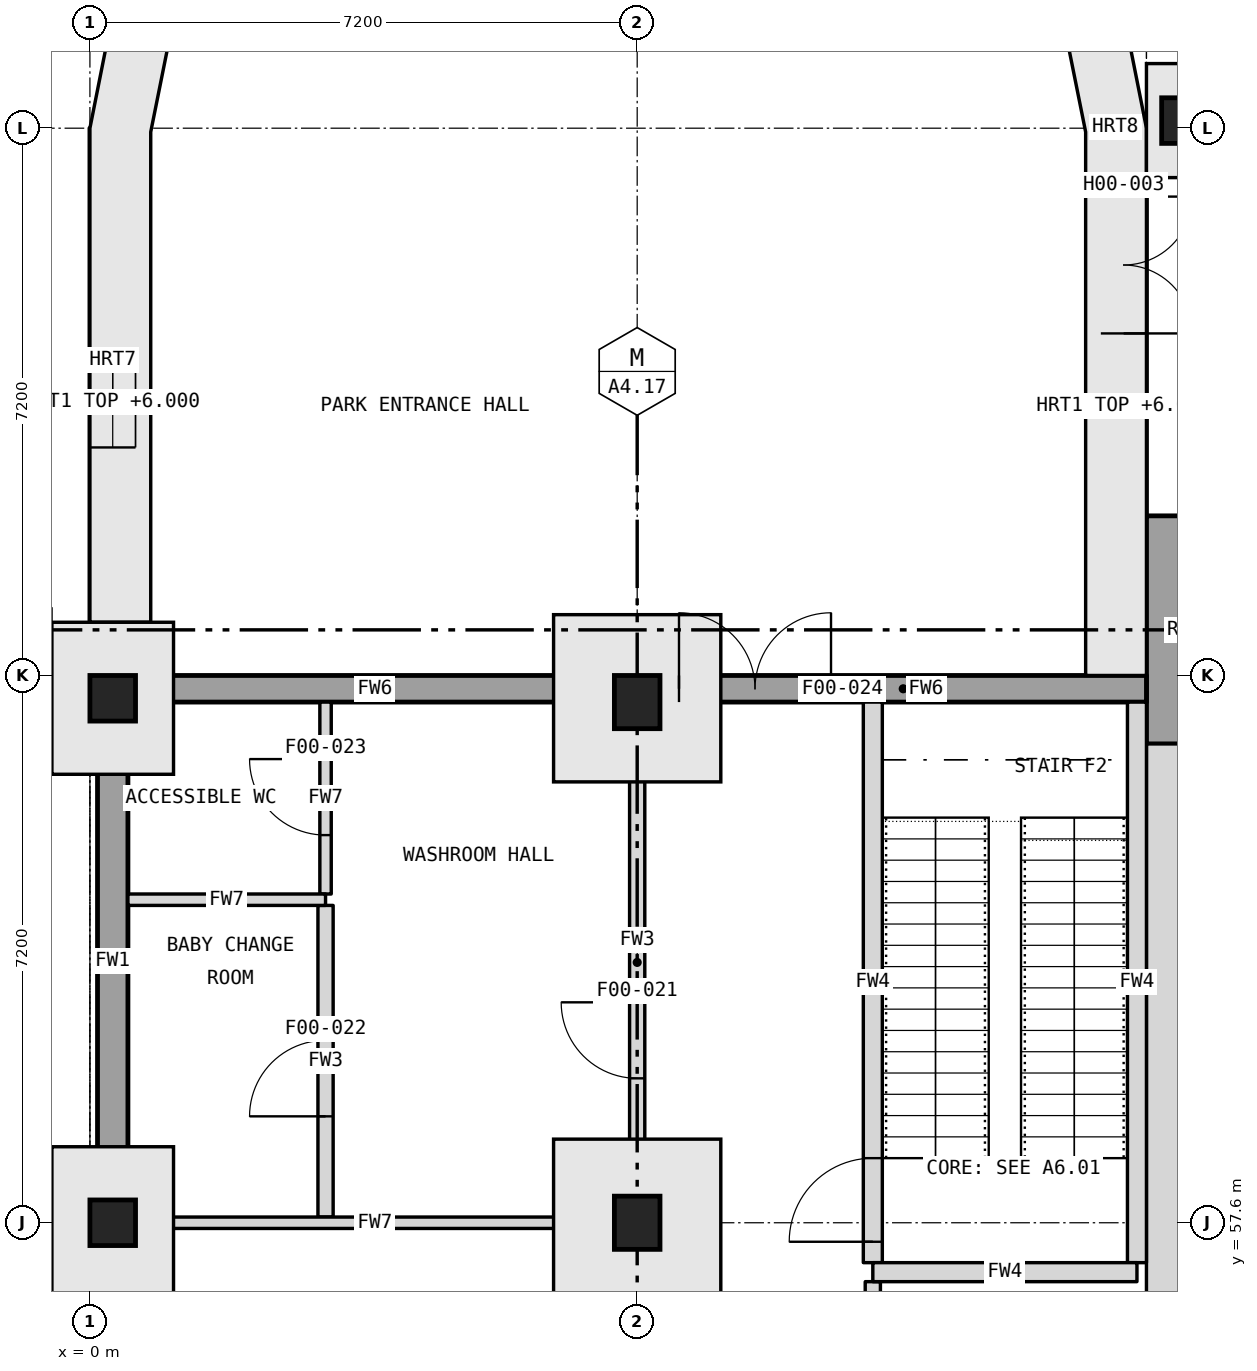
"""IFC4 building model, lengths in metres.
Left out: names, types, materials, properties, quantities, classifications, styles, units other than length and angle.
Written with IfcOpenShell. Run it as: python <this file> out.ifc"""

import sys

from ifc_helpers import new_model, si_unit, direction, frame, frame_2d, origin, origin_2d, place, context, subcontext, project, spatial, rectangle, extrude, element, fill, save


model = new_model("IFC4")
c1 = context("Model", 3, precision=1e-05, world=origin(), true_north=direction((0.0, 1.0)))
c2 = subcontext(c1, "Body", "Model", "MODEL_VIEW")
j1 = project(units=[si_unit("LENGTHUNIT", "METRE"), si_unit("PLANEANGLEUNIT", "RADIAN")], contexts=[c1])
p1 = place(None, origin())
s1 = spatial("IfcSite", under=j1, at=p1, CompositionType="ELEMENT")
p2 = place(p1, origin())
s2 = spatial("IfcBuilding", under=s1, at=p2, CompositionType="ELEMENT")
p3 = place(p2, origin())
s3 = spatial("IfcBuildingStorey", under=s2, at=p3, CompositionType="ELEMENT", Elevation=0.0)
p4 = place(p3, frame((0.3, 64.8, 0.0), z_axis=(0.0, 0.0, 1.0), x_axis=(0.0, 1.0, 0.0)))
e1 = element("IfcWall", 1, at=p4, inside=s3, PredefinedType="SOLIDWALL", context=c2, shape_type="SweptSolid", body=[
    extrude(rectangle(XDim=7.2, YDim=0.6, at=frame_2d((3.6, 0.0))), origin(), (0.0, 0.0, 1.0), 6.0),
])
p5 = place(p4, frame((3.0, 0.0, 0.9)))
e2 = element("IfcOpeningElement", 2, at=p5, cuts=e1, PredefinedType="OPENING", context=c2, shape_type="SweptSolid", body=[
    extrude(rectangle(XDim=1.2, YDim=2.6, at=frame_2d((0.6, 1.3))), frame((0.0, 0.31, 0.0), z_axis=(0.0, -1.0, 0.0), x_axis=(1.0, 0.0, 0.0)), (0.0, 0.0, 1.0), 0.62),
])
p6 = place(p3, frame((13.6, 64.7, 0.0), z_axis=(0.0, 0.0, 1.0), x_axis=(0.0, 1.0, 0.0)))
e3 = element("IfcWall", 3, at=p6, inside=s3, PredefinedType="SOLIDWALL", context=c2, shape_type="SweptSolid", body=[
    extrude(rectangle(XDim=7.3, YDim=0.6, at=frame_2d((3.65, 0.0))), origin(), (0.0, 0.0, 1.0), 6.0),
])
p7 = place(p6, frame((4.6, 0.0, 0.0)))
e4 = element("IfcOpeningElement", 4, at=p7, cuts=e3, PredefinedType="OPENING", context=c2, shape_type="SweptSolid", body=[
    extrude(rectangle(XDim=1.8, YDim=2.4, at=frame_2d((0.9, 1.2))), frame((0.0, 0.31, 0.0), z_axis=(0.0, -1.0, 0.0), x_axis=(1.0, 0.0, 0.0)), (0.0, 0.0, 1.0), 0.62),
])
p8 = place(p3, frame((14.4, 63.9, 0.0), z_axis=(0.0, 0.0, 1.0), x_axis=(0.0, 1.0, 0.0)))
e5 = element("IfcWall", 5, at=p8, inside=s3, PredefinedType="SOLIDWALL", context=c2, shape_type="SweptSolid", body=[
    extrude(rectangle(XDim=3.0, YDim=1.0, at=frame_2d((1.5, 0.0))), origin(), (0.0, 0.0, 1.0), 6.0),
])
p9 = place(p3, frame((14.4, 14.0, 0.0), z_axis=(0.0, 0.0, 1.0), x_axis=(0.0, 1.0, 0.0)))
e6 = element("IfcWall", 6, at=p9, inside=s3, PredefinedType="SOLIDWALL", context=c2, shape_type="SweptSolid", body=[
    extrude(rectangle(XDim=49.9, YDim=1.0, at=frame_2d((24.95, 0.0))), origin(), (0.0, 0.0, 1.0), 6.0),
])
p10 = place(p9, frame((30.9, 0.0, 0.0)))
e7 = element("IfcOpeningElement", 7, at=p10, cuts=e6, PredefinedType="OPENING", context=c2, shape_type="SweptSolid", body=[
    extrude(rectangle(XDim=2.4, YDim=2.7, at=frame_2d((1.2, 1.35))), frame((0.0, 0.51, 0.0), z_axis=(0.0, -1.0, 0.0), x_axis=(1.0, 0.0, 0.0)), (0.0, 0.0, 1.0), 1.02),
])
for number, where, z_axis, x_axis in (
    (8, (14.4, 72.1, -0.45), (0.0, 0.0, 1.0), (1.0, 0.0, 0.0)),
    (9, (0.3, 57.6, -0.45), (0.0, 0.0, 1.0), (1.0, 0.0, 0.0)),
    (10, (0.3, 64.5, -0.45), (0.0, 0.0, 1.0), (1.0, 0.0, 0.0)),
):
    element("IfcColumn", number, at=place(p3, frame(where, z_axis=z_axis, x_axis=x_axis)), inside=s3, PredefinedType="COLUMN", context=c2, shape_type="SweptSolid", body=[
        extrude(rectangle(XDim=0.6, YDim=0.6, at=origin_2d()), origin(), (0.0, 0.0, 1.0), 6.45),
    ])
p11 = place(p3, frame((7.2, 57.6, -0.405), z_axis=(0.0, 0.0, 1.0), x_axis=(1.0, 0.0, 0.0)))
e11 = element("IfcColumn", 11, at=p11, inside=s3, PredefinedType="COLUMN", context=c2, shape_type="SweptSolid", body=[
    extrude(rectangle(XDim=0.6, YDim=0.7, at=origin_2d()), origin(), (0.0, 0.0, 1.0), 6.405),
])
p12 = place(p3, frame((7.2, 64.45, -0.45), z_axis=(0.0, 0.0, 1.0), x_axis=(1.0, 0.0, 0.0)))
e12 = element("IfcColumn", 12, at=p12, inside=s3, PredefinedType="COLUMN", context=c2, shape_type="SweptSolid", body=[
    extrude(rectangle(XDim=0.6, YDim=0.7, at=origin_2d()), origin(), (0.0, 0.0, 1.0), 6.45),
])
p13 = place(p3, frame((0.6, 64.625, 0.0), z_axis=(0.0, 0.0, 1.0), x_axis=(1.0, 0.0, 0.0)))
e13 = element("IfcWall", 13, at=p13, inside=s3, PredefinedType="SOLIDWALL", context=c2, shape_type="SweptSolid", body=[
    extrude(rectangle(XDim=6.3, YDim=0.35, at=frame_2d((3.15, 0.0))), origin(), (0.0, 0.0, 1.0), 5.675),
])
p14 = place(p3, frame((7.5, 64.625, 0.0), z_axis=(0.0, 0.0, 1.0), x_axis=(1.0, 0.0, 0.0)))
e14 = element("IfcWall", 14, at=p14, inside=s3, PredefinedType="SOLIDWALL", context=c2, shape_type="SweptSolid", body=[
    extrude(rectangle(XDim=6.4, YDim=0.35, at=frame_2d((3.2, 0.0))), origin(), (0.0, 0.0, 1.0), 5.675),
])
p15 = place(p14, frame((0.25, 0.0, 0.0)))
e15 = element("IfcOpeningElement", 15, at=p15, cuts=e14, PredefinedType="OPENING", context=c2, shape_type="SweptSolid", body=[
    extrude(rectangle(XDim=2.0, YDim=2.4, at=frame_2d((1.0, 1.2))), frame((0.0, 0.185, 0.0), z_axis=(0.0, -1.0, 0.0), x_axis=(1.0, 0.0, 0.0)), (0.0, 0.0, 1.0), 0.37),
])
p16 = place(p3, frame((0.3, 50.7, 0.0), z_axis=(0.0, 0.0, 1.0), x_axis=(0.0, 1.0, 0.0)))
e16 = element("IfcWall", 16, at=p16, inside=s3, PredefinedType="SOLIDWALL", context=c2, shape_type="SweptSolid", body=[
    extrude(rectangle(XDim=6.6, YDim=0.4, at=frame_2d((3.3, 0.0))), origin(), (0.0, 0.0, 1.0), 5.675),
])
p17 = place(p16, frame((2.7, 0.0, 1.5)))
e17 = element("IfcOpeningElement", 17, at=p17, cuts=e16, PredefinedType="OPENING", context=c2, shape_type="SweptSolid", body=[
    extrude(rectangle(XDim=1.2, YDim=1.2, at=frame_2d((0.6, 0.6))), frame((0.0, 0.21, 0.0), z_axis=(0.0, -1.0, 0.0), x_axis=(1.0, 0.0, 0.0)), (0.0, 0.0, 1.0), 0.42),
])
p18 = place(p3, frame((0.3, 57.9, 0.0), z_axis=(0.0, 0.0, 1.0), x_axis=(0.0, 1.0, 0.0)))
e18 = element("IfcWall", 18, at=p18, inside=s3, PredefinedType="SOLIDWALL", context=c2, shape_type="SweptSolid", body=[
    extrude(rectangle(XDim=6.3, YDim=0.4, at=frame_2d((3.15, 0.0))), origin(), (0.0, 0.0, 1.0), 5.675),
])
p19 = place(p3, frame((3.1, 61.925, 0.0), z_axis=(0.0, 0.0, 1.0), x_axis=(0.0, 1.0, 0.0)))
e19 = element("IfcWall", 19, at=p19, inside=s3, PredefinedType="PARTITIONING", context=c2, shape_type="SweptSolid", body=[
    extrude(rectangle(XDim=2.525, YDim=0.15, at=frame_2d((1.262, 0.0))), origin(), (0.0, 0.0, 1.0), 5.675),
])
p20 = place(p19, frame((0.775, 0.0, 0.0)))
e20 = element("IfcOpeningElement", 20, at=p20, cuts=e19, PredefinedType="OPENING", context=c2, shape_type="SweptSolid", body=[
    extrude(rectangle(XDim=1.0, YDim=2.1, at=frame_2d((0.5, 1.05))), frame((0.0, 0.085, 0.0), z_axis=(0.0, -1.0, 0.0), x_axis=(1.0, 0.0, 0.0)), (0.0, 0.0, 1.0), 0.17),
])
p21 = place(p3, frame((3.1, 57.675, 0.0), z_axis=(0.0, 0.0, 1.0), x_axis=(0.0, 1.0, 0.0)))
e21 = element("IfcWall", 21, at=p21, inside=s3, PredefinedType="PARTITIONING", context=c2, shape_type="SweptSolid", body=[
    extrude(rectangle(XDim=4.1, YDim=0.2, at=frame_2d((2.05, 0.0))), origin(), (0.0, 0.0, 1.0), 5.675),
])
p22 = place(p21, frame((1.325, 0.0, 0.0)))
e22 = element("IfcOpeningElement", 22, at=p22, cuts=e21, PredefinedType="OPENING", context=c2, shape_type="SweptSolid", body=[
    extrude(rectangle(XDim=1.0, YDim=2.1, at=frame_2d((0.5, 1.05))), frame((0.0, 0.11, 0.0), z_axis=(0.0, -1.0, 0.0), x_axis=(1.0, 0.0, 0.0)), (0.0, 0.0, 1.0), 0.22),
])
p23 = place(p3, frame((7.2, 50.75, 0.0), z_axis=(0.0, 0.0, 1.0), x_axis=(0.0, 1.0, 0.0)))
e23 = element("IfcWall", 23, at=p23, inside=s3, PredefinedType="PARTITIONING", context=c2, shape_type="SweptSolid", body=[
    extrude(rectangle(XDim=6.5, YDim=0.15, at=frame_2d((3.25, 0.0))), origin(), (0.0, 0.0, 1.0), 5.675),
])
p24 = place(p3, frame((7.2, 57.95, 0.0), z_axis=(0.0, 0.0, 1.0), x_axis=(0.0, 1.0, 0.0)))
e24 = element("IfcWall", 24, at=p24, inside=s3, PredefinedType="PARTITIONING", context=c2, shape_type="SweptSolid", body=[
    extrude(rectangle(XDim=6.15, YDim=0.2, at=frame_2d((3.075, 0.0))), origin(), (0.0, 0.0, 1.0), 5.675),
])
p25 = place(p24, frame((1.55, 0.0, 0.0)))
e25 = element("IfcOpeningElement", 25, at=p25, cuts=e24, PredefinedType="OPENING", context=c2, shape_type="SweptSolid", body=[
    extrude(rectangle(XDim=1.0, YDim=2.1, at=frame_2d((0.5, 1.05))), frame((0.0, 0.11, 0.0), z_axis=(0.0, -1.0, 0.0), x_axis=(1.0, 0.0, 0.0)), (0.0, 0.0, 1.0), 0.22),
])
p26 = place(p3, frame((10.3, 57.075, 0.0), z_axis=(0.0, 0.0, 1.0), x_axis=(0.0, 1.0, 0.0)))
e26 = element("IfcWall", 26, at=p26, inside=s3, PredefinedType="SOLIDWALL", context=c2, shape_type="SweptSolid", body=[
    extrude(rectangle(XDim=7.375, YDim=0.25, at=frame_2d((3.688, 0.0))), origin(), (0.0, 0.0, 1.0), 5.675),
])
p27 = place(p26, frame((0.275, 0.0, 0.0)))
e27 = element("IfcOpeningElement", 27, at=p27, cuts=e26, PredefinedType="OPENING", context=c2, shape_type="SweptSolid", body=[
    extrude(rectangle(XDim=1.1, YDim=2.1, at=frame_2d((0.55, 1.05))), frame((0.0, 0.135, 0.0), z_axis=(0.0, -1.0, 0.0), x_axis=(1.0, 0.0, 0.0)), (0.0, 0.0, 1.0), 0.27),
])
p28 = place(p3, frame((10.3, 54.075, 0.0), z_axis=(0.0, 0.0, 1.0), x_axis=(0.0, 1.0, 0.0)))
e28 = element("IfcWall", 28, at=p28, inside=s3, PredefinedType="PARTITIONING", context=c2, shape_type="SweptSolid", body=[
    extrude(rectangle(XDim=2.75, YDim=0.2, at=frame_2d((1.375, 0.0))), origin(), (0.0, 0.0, 1.0), 5.675),
])
p29 = place(p28, frame((0.825, 0.0, 0.0)))
e29 = element("IfcOpeningElement", 29, at=p29, cuts=e28, PredefinedType="OPENING", context=c2, shape_type="SweptSolid", body=[
    extrude(rectangle(XDim=1.0, YDim=2.1, at=frame_2d((0.5, 1.05))), frame((0.0, 0.11, 0.0), z_axis=(0.0, -1.0, 0.0), x_axis=(1.0, 0.0, 0.0)), (0.0, 0.0, 1.0), 0.22),
])
p30 = place(p3, frame((13.775, 57.075, 0.0), z_axis=(0.0, 0.0, 1.0), x_axis=(0.0, 1.0, 0.0)))
e30 = element("IfcWall", 30, at=p30, inside=s3, PredefinedType="SOLIDWALL", context=c2, shape_type="SweptSolid", body=[
    extrude(rectangle(XDim=7.375, YDim=0.25, at=frame_2d((3.688, 0.0))), origin(), (0.0, 0.0, 1.0), 5.675),
])
p31 = place(p3, frame((10.3, 56.95, 0.0), z_axis=(0.0, 0.0, 1.0), x_axis=(1.0, 0.0, 0.0)))
e31 = element("IfcWall", 31, at=p31, inside=s3, PredefinedType="SOLIDWALL", context=c2, shape_type="SweptSolid", body=[
    extrude(rectangle(XDim=3.475, YDim=0.25, at=frame_2d((1.737, 0.0))), origin(), (0.0, 0.0, 1.0), 5.675),
])
p32 = place(p3, frame((0.6, 57.6, 0.0), z_axis=(0.0, 0.0, 1.0), x_axis=(1.0, 0.0, 0.0)))
e32 = element("IfcWall", 32, at=p32, inside=s3, PredefinedType="PARTITIONING", context=c2, shape_type="SweptSolid", body=[
    extrude(rectangle(XDim=6.3, YDim=0.15, at=frame_2d((3.15, 0.0))), origin(), (0.0, 0.0, 1.0), 5.675),
])
p33 = place(p3, frame((0.5, 61.85, 0.0), z_axis=(0.0, 0.0, 1.0), x_axis=(1.0, 0.0, 0.0)))
e33 = element("IfcWall", 33, at=p33, inside=s3, PredefinedType="PARTITIONING", context=c2, shape_type="SweptSolid", body=[
    extrude(rectangle(XDim=2.6, YDim=0.15, at=frame_2d((1.3, 0.0))), origin(), (0.0, 0.0, 1.0), 5.675),
])
p34 = place(p5, origin())
e34 = element("IfcWindow", 34, at=p34, inside=s3, PartitioningType="DOUBLE_PANEL_VERTICAL", PredefinedType="WINDOW", context=c2, shape_type="SweptSolid", body=[
    extrude(rectangle(XDim=1.2, YDim=2.6, at=frame_2d((0.6, 1.3))), frame((0.0, 0.03, 0.0), z_axis=(0.0, -1.0, 0.0), x_axis=(1.0, 0.0, 0.0)), (0.0, 0.0, 1.0), 0.06),
])
fill(e2, e34)
p35 = place(p7, frame((1.8, 0.0, 0.0), z_axis=(0.0, 0.0, 1.0), x_axis=(-1.0, 0.0, 0.0)))
e35 = element("IfcDoor", 35, at=p35, inside=s3, OperationType="DOUBLE_DOOR_SINGLE_SWING", PredefinedType="DOOR", context=c2, shape_type="SweptSolid", body=[
    extrude(rectangle(XDim=1.8, YDim=2.4, at=frame_2d((0.9, 1.2))), frame((0.0, 0.025, 0.0), z_axis=(0.0, -1.0, 0.0), x_axis=(1.0, 0.0, 0.0)), (0.0, 0.0, 1.0), 0.05),
])
fill(e4, e35)
p36 = place(p27, origin())
e36 = element("IfcDoor", 36, at=p36, inside=s3, OperationType="SINGLE_SWING_LEFT", PredefinedType="DOOR", context=c2, shape_type="SweptSolid", body=[
    extrude(rectangle(XDim=1.1, YDim=2.1, at=frame_2d((0.55, 1.05))), frame((0.0, 0.025, 0.0), z_axis=(0.0, -1.0, 0.0), x_axis=(1.0, 0.0, 0.0)), (0.0, 0.0, 1.0), 0.05),
])
fill(e27, e36)
p37 = place(p25, origin())
e37 = element("IfcDoor", 37, at=p37, inside=s3, OperationType="SINGLE_SWING_RIGHT", PredefinedType="DOOR", context=c2, shape_type="SweptSolid", body=[
    extrude(rectangle(XDim=1.0, YDim=2.1, at=frame_2d((0.5, 1.05))), frame((0.0, 0.025, 0.0), z_axis=(0.0, -1.0, 0.0), x_axis=(1.0, 0.0, 0.0)), (0.0, 0.0, 1.0), 0.05),
])
fill(e25, e37)
p38 = place(p22, origin())
e38 = element("IfcDoor", 38, at=p38, inside=s3, OperationType="SINGLE_SWING_LEFT", PredefinedType="DOOR", context=c2, shape_type="SweptSolid", body=[
    extrude(rectangle(XDim=1.0, YDim=2.1, at=frame_2d((0.5, 1.05))), frame((0.0, 0.025, 0.0), z_axis=(0.0, -1.0, 0.0), x_axis=(1.0, 0.0, 0.0)), (0.0, 0.0, 1.0), 0.05),
])
fill(e22, e38)
p39 = place(p20, origin())
e39 = element("IfcDoor", 39, at=p39, inside=s3, OperationType="SINGLE_SWING_RIGHT", PredefinedType="DOOR", context=c2, shape_type="SweptSolid", body=[
    extrude(rectangle(XDim=1.0, YDim=2.1, at=frame_2d((0.5, 1.05))), frame((0.0, 0.025, 0.0), z_axis=(0.0, -1.0, 0.0), x_axis=(1.0, 0.0, 0.0)), (0.0, 0.0, 1.0), 0.05),
])
fill(e20, e39)
p40 = place(p15, origin())
e40 = element("IfcDoor", 40, at=p40, inside=s3, OperationType="DOUBLE_DOOR_SINGLE_SWING", PredefinedType="DOOR", context=c2, shape_type="SweptSolid", body=[
    extrude(rectangle(XDim=2.0, YDim=2.4, at=frame_2d((1.0, 1.2))), frame((0.0, 0.025, 0.0), z_axis=(0.0, -1.0, 0.0), x_axis=(1.0, 0.0, 0.0)), (0.0, 0.0, 1.0), 0.05),
])
fill(e15, e40)
save(model, sys.argv[1])
